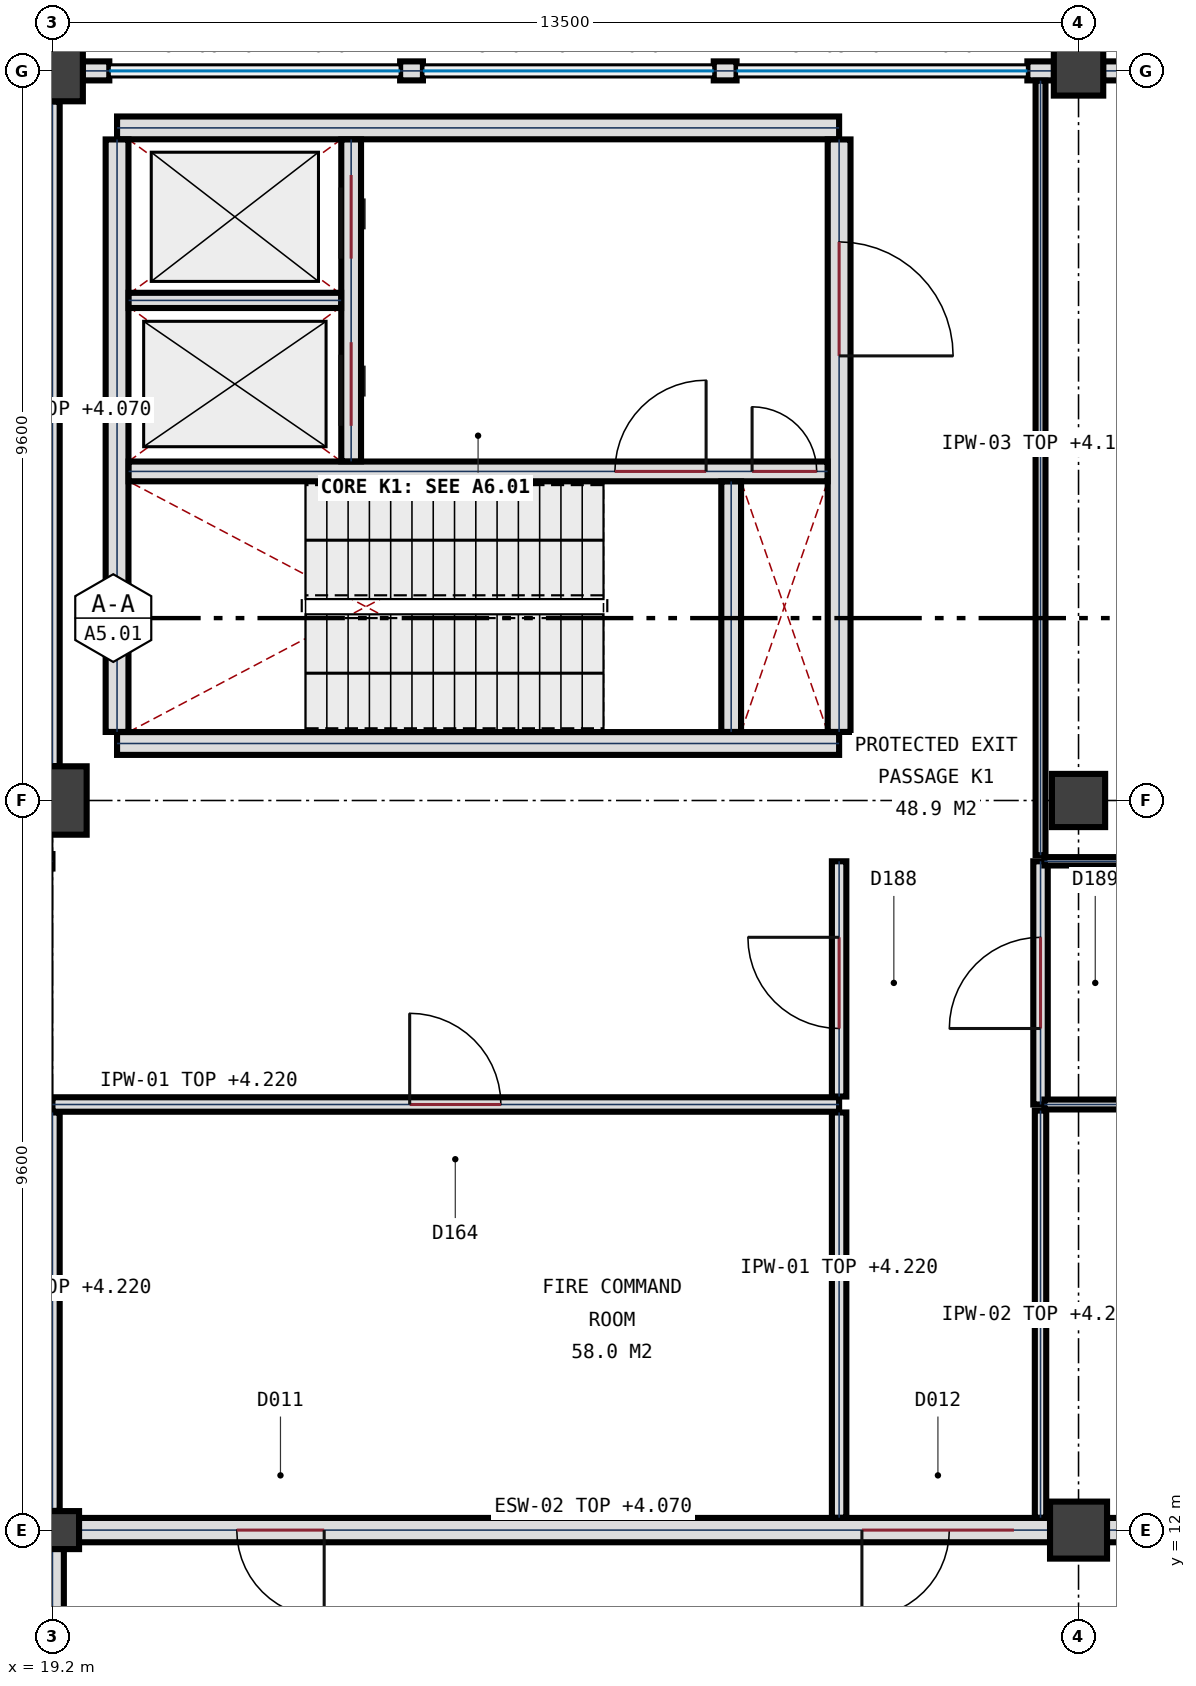
"""IFC4 building model, lengths in metres.
Left out: names, types, materials, properties, quantities, classifications, styles, units other than length and angle.
Written with IfcOpenShell. Run it as: python <this file> out.ifc"""

import sys

from ifc_helpers import new_model, si_unit, direction, frame, frame_2d, origin, origin_2d, place, context, subcontext, project, spatial, rectangle, circle, extrude, element, fill, save


model = new_model("IFC4")
c1 = context("Model", 3, precision=1e-05, world=origin(), true_north=direction((0.0, 1.0)))
c2 = subcontext(c1, "Body", "Model", "MODEL_VIEW")
j1 = project(units=[si_unit("LENGTHUNIT", "METRE"), si_unit("PLANEANGLEUNIT", "RADIAN")], contexts=[c1])
p1 = place(None, origin())
s1 = spatial("IfcSite", under=j1, at=p1, CompositionType="ELEMENT")
p2 = place(p1, origin())
s2 = spatial("IfcBuilding", under=s1, at=p2, CompositionType="ELEMENT")
p3 = place(p2, origin())
s3 = spatial("IfcBuildingStorey", under=s2, at=p3, CompositionType="ELEMENT", Elevation=0.0)
p4 = place(p3, frame((19.2, 12.0, 0.0), z_axis=(0.0, 0.0, 1.0), x_axis=(1.0, 0.0, 0.0)))
e1 = element("IfcColumn", 1, at=p4, inside=s3, PredefinedType="COLUMN", context=c2, shape_type="SweptSolid", body=[
    extrude(rectangle(XDim=0.7, YDim=0.5, at=origin_2d()), origin(), (0.0, 0.0, 1.0), 5.4),
])
p5 = place(p3, frame((19.2, 21.6, 0.0), z_axis=(0.0, 0.0, 1.0), x_axis=(1.0, 0.0, 0.0)))
e2 = element("IfcColumn", 2, at=p5, inside=s3, PredefinedType="COLUMN", context=c2, shape_type="SweptSolid", body=[
    extrude(circle(Radius=0.45, at=origin_2d()), origin(), (0.0, 0.0, 1.0), 5.4),
])
p6 = place(p3, frame((19.2, 31.2, 0.0), z_axis=(0.0, 0.0, 1.0), x_axis=(1.0, 0.0, 0.0)))
e3 = element("IfcColumn", 3, at=p6, inside=s3, PredefinedType="COLUMN", context=c2, shape_type="SweptSolid", body=[
    extrude(circle(Radius=0.4, at=origin_2d()), origin(), (0.0, 0.0, 1.0), 5.4),
])
p7 = place(p3, frame((32.7, 12.0, 0.0), z_axis=(0.0, 0.0, 1.0), x_axis=(1.0, 0.0, 0.0)))
e4 = element("IfcColumn", 4, at=p7, inside=s3, PredefinedType="COLUMN", context=c2, shape_type="SweptSolid", body=[
    extrude(rectangle(XDim=0.75, YDim=0.75, at=origin_2d()), origin(), (0.0, 0.0, 1.0), 5.4),
])
p8 = place(p3, frame((32.7, 21.6, 0.0), z_axis=(0.0, 0.0, 1.0), x_axis=(1.0, 0.0, 0.0)))
e5 = element("IfcColumn", 5, at=p8, inside=s3, PredefinedType="COLUMN", context=c2, shape_type="SweptSolid", body=[
    extrude(rectangle(XDim=0.7, YDim=0.7, at=origin_2d()), origin(), (0.0, 0.0, 1.0), 5.4),
])
p9 = place(p3, frame((32.7, 31.2, 0.0), z_axis=(0.0, 0.0, 1.0), x_axis=(1.0, 0.0, 0.0)))
e6 = element("IfcColumn", 6, at=p9, inside=s3, PredefinedType="COLUMN", context=c2, shape_type="SweptSolid", body=[
    extrude(rectangle(XDim=0.65, YDim=0.65, at=origin_2d()), origin(), (0.0, 0.0, 1.0), 5.4),
])
p10 = place(p3, frame((45.902, 12.0, 0.0), z_axis=(0.0, 0.0, 1.0), x_axis=(-1.0, 0.0, 0.0)))
e7 = element("IfcWall", 7, at=p10, inside=s3, PredefinedType="SOLIDWALL", context=c2, shape_type="SweptSolid", body=[
    extrude(rectangle(XDim=12.829, YDim=0.32, at=frame_2d((6.415, 0.0))), origin(), (0.0, 0.0, 1.0), 3.74),
])
p11 = place(p10, frame((2.492, 0.0, 0.0)))
e8 = element("IfcOpeningElement", 8, at=p11, cuts=e7, PredefinedType="OPENING", context=c2, shape_type="SweptSolid", body=[
    extrude(rectangle(XDim=2.2, YDim=2.45, at=frame_2d((1.1, 1.225))), frame((0.0, 0.17, 0.0), z_axis=(0.0, -1.0, 0.0), x_axis=(1.0, 0.0, 0.0)), (0.0, 0.0, 1.0), 0.34),
])
p12 = place(p10, frame((8.137, 0.0, 0.0)))
e9 = element("IfcOpeningElement", 9, at=p12, cuts=e7, PredefinedType="OPENING", context=c2, shape_type="SweptSolid", body=[
    extrude(rectangle(XDim=2.2, YDim=2.45, at=frame_2d((1.1, 1.225))), frame((0.0, 0.17, 0.0), z_axis=(0.0, -1.0, 0.0), x_axis=(1.0, 0.0, 0.0)), (0.0, 0.0, 1.0), 0.34),
])
p13 = place(p3, frame((32.327, 12.0, 0.0), z_axis=(0.0, 0.0, 1.0), x_axis=(-1.0, 0.0, 0.0)))
e10 = element("IfcWall", 10, at=p13, inside=s3, PredefinedType="SOLIDWALL", context=c2, shape_type="SweptSolid", body=[
    extrude(rectangle(XDim=12.779, YDim=0.32, at=frame_2d((6.389, 0.0))), origin(), (0.0, 0.0, 1.0), 4.07),
])
p14 = place(p13, frame((9.552, 0.0, 0.0)))
e11 = element("IfcOpeningElement", 11, at=p14, cuts=e10, PredefinedType="OPENING", context=c2, shape_type="SweptSolid", body=[
    extrude(rectangle(XDim=1.15, YDim=2.15, at=frame_2d((0.575, 1.075))), frame((0.0, 0.17, 0.0), z_axis=(0.0, -1.0, 0.0), x_axis=(1.0, 0.0, 0.0)), (0.0, 0.0, 1.0), 0.34),
])
p15 = place(p13, frame((0.477, 0.0, 0.0)))
e12 = element("IfcOpeningElement", 12, at=p15, cuts=e10, PredefinedType="OPENING", context=c2, shape_type="SweptSolid", body=[
    extrude(rectangle(XDim=2.0, YDim=2.35, at=frame_2d((1.0, 1.175))), frame((0.0, 0.17, 0.0), z_axis=(0.0, -1.0, 0.0), x_axis=(1.0, 0.0, 0.0)), (0.0, 0.0, 1.0), 0.34),
])
p16 = place(p3, frame((19.2, 11.752, 0.0), z_axis=(0.0, 0.0, 1.0), x_axis=(0.0, -1.0, 0.0)))
e13 = element("IfcWall", 13, at=p16, inside=s3, PredefinedType="SOLIDWALL", context=c2, shape_type="SweptSolid", body=[
    extrude(rectangle(XDim=2.95, YDim=0.3, at=frame_2d((1.475, 0.0))), origin(), (0.0, 0.0, 1.0), 4.22),
])
p17 = place(p3, frame((19.598, 31.2, 0.0), z_axis=(0.0, 0.0, 1.0), x_axis=(1.0, 0.0, 0.0)))
e14 = element("IfcWall", 14, at=p17, inside=s3, PredefinedType="SOLIDWALL", context=c2, shape_type="SweptSolid", body=[
    extrude(rectangle(XDim=0.35, YDim=0.25, at=frame_2d((0.175, 0.0))), origin(), (0.0, 0.0, 1.0), 4.07),
])
p18 = place(p3, frame((32.027, 31.2, 0.0), z_axis=(0.0, 0.0, 1.0), x_axis=(1.0, 0.0, 0.0)))
e15 = element("IfcWall", 15, at=p18, inside=s3, PredefinedType="SOLIDWALL", context=c2, shape_type="SweptSolid", body=[
    extrude(rectangle(XDim=0.35, YDim=0.25, at=frame_2d((0.175, 0.0))), origin(), (0.0, 0.0, 1.0), 4.07),
])
p19 = place(p3, frame((23.774, 31.2, 0.0), z_axis=(0.0, 0.0, 1.0), x_axis=(1.0, 0.0, 0.0)))
e16 = element("IfcWall", 16, at=p19, inside=s3, PredefinedType="SOLIDWALL", context=c2, shape_type="SweptSolid", body=[
    extrude(rectangle(XDim=0.3, YDim=0.25, at=frame_2d((0.15, 0.0))), origin(), (0.0, 0.0, 1.0), 4.07),
])
p20 = place(p3, frame((27.901, 31.2, 0.0), z_axis=(0.0, 0.0, 1.0), x_axis=(1.0, 0.0, 0.0)))
e17 = element("IfcWall", 17, at=p20, inside=s3, PredefinedType="SOLIDWALL", context=c2, shape_type="SweptSolid", body=[
    extrude(rectangle(XDim=0.3, YDim=0.25, at=frame_2d((0.15, 0.0))), origin(), (0.0, 0.0, 1.0), 4.07),
])
p21 = place(p3, frame((33.023, 31.2, 0.0), z_axis=(0.0, 0.0, 1.0), x_axis=(1.0, 0.0, 0.0)))
e18 = element("IfcWall", 18, at=p21, inside=s3, PredefinedType="SOLIDWALL", context=c2, shape_type="SweptSolid", body=[
    extrude(rectangle(XDim=0.35, YDim=0.25, at=frame_2d((0.175, 0.0))), origin(), (0.0, 0.0, 1.0), 4.17),
])
for number, where, z_axis, x_axis in (
    (19, (29.55, 22.35, 0.0), (0.0, 0.0, 1.0), (-1.0, 0.0, 0.0)),
    (20, (20.05, 30.45, 0.0), (0.0, 0.0, 1.0), (1.0, 0.0, 0.0)),
):
    element("IfcWall", number, at=place(p3, frame(where, z_axis=z_axis, x_axis=x_axis)), inside=s3, PredefinedType="SHEAR", context=c2, shape_type="SweptSolid", body=[
        extrude(rectangle(XDim=9.5, YDim=0.3, at=frame_2d((4.75, 0.0))), origin(), (0.0, 0.0, 1.0), 5.4),
    ])
p22 = place(p3, frame((20.05, 22.502, 0.0), z_axis=(0.0, 0.0, 1.0), x_axis=(0.0, 1.0, 0.0)))
e21 = element("IfcWall", 21, at=p22, inside=s3, PredefinedType="SHEAR", context=c2, shape_type="SweptSolid", body=[
    extrude(rectangle(XDim=7.796, YDim=0.3, at=frame_2d((3.898, 0.0))), origin(), (0.0, 0.0, 1.0), 5.4),
])
p23 = place(p3, frame((29.55, 30.298, 0.0), z_axis=(0.0, 0.0, 1.0), x_axis=(0.0, -1.0, 0.0)))
e22 = element("IfcWall", 22, at=p23, inside=s3, PredefinedType="SHEAR", context=c2, shape_type="SweptSolid", body=[
    extrude(rectangle(XDim=7.796, YDim=0.3, at=frame_2d((3.898, 0.0))), origin(), (0.0, 0.0, 1.0), 5.4),
])
p24 = place(p23, frame((1.348, 0.0, 0.0)))
e23 = element("IfcOpeningElement", 23, at=p24, cuts=e22, PredefinedType="OPENING", context=c2, shape_type="SweptSolid", body=[
    extrude(rectangle(XDim=1.5, YDim=2.25, at=frame_2d((0.75, 1.125))), frame((0.0, 0.16, 0.0), z_axis=(0.0, -1.0, 0.0), x_axis=(1.0, 0.0, 0.0)), (0.0, 0.0, 1.0), 0.32),
])
p25 = place(p3, frame((20.202, 25.93, 0.0), z_axis=(0.0, 0.0, 1.0), x_axis=(1.0, 0.0, 0.0)))
e24 = element("IfcWall", 24, at=p25, inside=s3, PredefinedType="SHEAR", context=c2, shape_type="SweptSolid", body=[
    extrude(rectangle(XDim=9.196, YDim=0.26, at=frame_2d((4.598, 0.0))), origin(), (0.0, 0.0, 1.0), 5.4),
])
p26 = place(p25, frame((6.398, 0.0, 0.0)))
e25 = element("IfcOpeningElement", 25, at=p26, cuts=e24, PredefinedType="OPENING", context=c2, shape_type="SweptSolid", body=[
    extrude(rectangle(XDim=1.2, YDim=2.2, at=frame_2d((0.6, 1.1))), frame((0.0, 0.14, 0.0), z_axis=(0.0, -1.0, 0.0), x_axis=(1.0, 0.0, 0.0)), (0.0, 0.0, 1.0), 0.28),
])
p27 = place(p25, frame((8.203, 0.0, 0.0)))
e26 = element("IfcOpeningElement", 26, at=p27, cuts=e24, PredefinedType="OPENING", context=c2, shape_type="SweptSolid", body=[
    extrude(rectangle(XDim=0.85, YDim=2.05, at=frame_2d((0.425, 1.025))), frame((0.0, 0.14, 0.0), z_axis=(0.0, -1.0, 0.0), x_axis=(1.0, 0.0, 0.0)), (0.0, 0.0, 1.0), 0.28),
])
p28 = place(p3, frame((28.13, 22.502, 0.0), z_axis=(0.0, 0.0, 1.0), x_axis=(0.0, 1.0, 0.0)))
e27 = element("IfcWall", 27, at=p28, inside=s3, PredefinedType="SHEAR", context=c2, shape_type="SweptSolid", body=[
    extrude(rectangle(XDim=3.296, YDim=0.26, at=frame_2d((1.648, 0.0))), origin(), (0.0, 0.0, 1.0), 5.4),
])
p29 = place(p3, frame((23.13, 26.062, 0.0), z_axis=(0.0, 0.0, 1.0), x_axis=(0.0, 1.0, 0.0)))
e28 = element("IfcWall", 28, at=p29, inside=s3, PredefinedType="SHEAR", context=c2, shape_type="SweptSolid", body=[
    extrude(rectangle(XDim=4.236, YDim=0.26, at=frame_2d((2.118, 0.0))), origin(), (0.0, 0.0, 1.0), 5.4),
])
p30 = place(p29, frame((0.468, 0.0, 0.0)))
e29 = element("IfcOpeningElement", 29, at=p30, cuts=e28, PredefinedType="OPENING", context=c2, shape_type="SweptSolid", body=[
    extrude(rectangle(XDim=1.1, YDim=2.15, at=frame_2d((0.55, 1.075))), frame((0.0, 0.14, 0.0), z_axis=(0.0, -1.0, 0.0), x_axis=(1.0, 0.0, 0.0)), (0.0, 0.0, 1.0), 0.28),
])
p31 = place(p29, frame((2.668, 0.0, 0.0)))
e30 = element("IfcOpeningElement", 30, at=p31, cuts=e28, PredefinedType="OPENING", context=c2, shape_type="SweptSolid", body=[
    extrude(rectangle(XDim=1.1, YDim=2.15, at=frame_2d((0.55, 1.075))), frame((0.0, 0.14, 0.0), z_axis=(0.0, -1.0, 0.0), x_axis=(1.0, 0.0, 0.0)), (0.0, 0.0, 1.0), 0.28),
])
p32 = place(p3, frame((20.202, 28.18, 0.0), z_axis=(0.0, 0.0, 1.0), x_axis=(1.0, 0.0, 0.0)))
e31 = element("IfcWall", 31, at=p32, inside=s3, PredefinedType="PLUMBINGWALL", context=c2, shape_type="SweptSolid", body=[
    extrude(rectangle(XDim=2.796, YDim=0.2, at=frame_2d((1.398, 0.0))), origin(), (0.0, 0.0, 1.0), 5.08),
])
p33 = place(p3, frame((19.2, 17.6, 0.0), z_axis=(0.0, 0.0, 1.0), x_axis=(1.0, 0.0, 0.0)))
e32 = element("IfcWall", 32, at=p33, inside=s3, PredefinedType="PARTITIONING", context=c2, shape_type="SweptSolid", body=[
    extrude(rectangle(XDim=10.35, YDim=0.19, at=frame_2d((5.175, 0.0))), origin(), (0.0, 0.0, 1.0), 4.22),
])
p34 = place(p33, frame((4.7, 0.0, 0.0)))
e33 = element("IfcOpeningElement", 33, at=p34, cuts=e32, PredefinedType="OPENING", context=c2, shape_type="SweptSolid", body=[
    extrude(rectangle(XDim=1.2, YDim=2.2, at=frame_2d((0.6, 1.1))), frame((0.0, 0.105, 0.0), z_axis=(0.0, -1.0, 0.0), x_axis=(1.0, 0.0, 0.0)), (0.0, 0.0, 1.0), 0.21),
])
p35 = place(p3, frame((19.2, 12.253, 0.0), z_axis=(0.0, 0.0, 1.0), x_axis=(0.0, 1.0, 0.0)))
e34 = element("IfcWall", 34, at=p35, inside=s3, PredefinedType="PARTITIONING", context=c2, shape_type="SweptSolid", body=[
    extrude(rectangle(XDim=5.242, YDim=0.19, at=frame_2d((2.621, 0.0))), origin(), (0.0, 0.0, 1.0), 4.22),
])
p36 = place(p3, frame((29.55, 12.163, 0.0), z_axis=(0.0, 0.0, 1.0), x_axis=(0.0, 1.0, 0.0)))
e35 = element("IfcWall", 35, at=p36, inside=s3, PredefinedType="PARTITIONING", context=c2, shape_type="SweptSolid", body=[
    extrude(rectangle(XDim=5.332, YDim=0.19, at=frame_2d((2.666, 0.0))), origin(), (0.0, 0.0, 1.0), 4.22),
])
p37 = place(p3, frame((29.55, 17.705, 0.0), z_axis=(0.0, 0.0, 1.0), x_axis=(0.0, 1.0, 0.0)))
e36 = element("IfcWall", 36, at=p37, inside=s3, PredefinedType="PARTITIONING", context=c2, shape_type="SweptSolid", body=[
    extrude(rectangle(XDim=3.095, YDim=0.19, at=frame_2d((1.547, 0.0))), origin(), (0.0, 0.0, 1.0), 5.08),
])
p38 = place(p37, frame((0.895, 0.0, 0.0)))
e37 = element("IfcOpeningElement", 37, at=p38, cuts=e36, PredefinedType="OPENING", context=c2, shape_type="SweptSolid", body=[
    extrude(rectangle(XDim=1.2, YDim=2.2, at=frame_2d((0.6, 1.1))), frame((0.0, 0.105, 0.0), z_axis=(0.0, -1.0, 0.0), x_axis=(1.0, 0.0, 0.0)), (0.0, 0.0, 1.0), 0.21),
])
p39 = place(p3, frame((32.2, 17.6, 0.0), z_axis=(0.0, 0.0, 1.0), x_axis=(0.0, 1.0, 0.0)))
e38 = element("IfcWall", 38, at=p39, inside=s3, PredefinedType="PARTITIONING", context=c2, shape_type="SweptSolid", body=[
    extrude(rectangle(XDim=3.2, YDim=0.19, at=frame_2d((1.6, 0.0))), origin(), (0.0, 0.0, 1.0), 5.08),
])
p40 = place(p39, frame((1.0, 0.0, 0.0)))
e39 = element("IfcOpeningElement", 39, at=p40, cuts=e38, PredefinedType="OPENING", context=c2, shape_type="SweptSolid", body=[
    extrude(rectangle(XDim=1.2, YDim=2.2, at=frame_2d((0.6, 1.1))), frame((0.0, 0.105, 0.0), z_axis=(0.0, -1.0, 0.0), x_axis=(1.0, 0.0, 0.0)), (0.0, 0.0, 1.0), 0.21),
])
p41 = place(p3, frame((32.25, 17.6, 0.0), z_axis=(0.0, 0.0, 1.0), x_axis=(1.0, 0.0, 0.0)))
e40 = element("IfcWall", 40, at=p41, inside=s3, PredefinedType="PARTITIONING", context=c2, shape_type="SweptSolid", body=[
    extrude(rectangle(XDim=42.7, YDim=0.13, at=frame_2d((21.35, 0.0))), origin(), (0.0, 0.0, 1.0), 4.42),
])
p42 = place(p41, frame((16.325, 0.0, 0.0)))
e41 = element("IfcOpeningElement", 41, at=p42, cuts=e40, PredefinedType="OPENING", context=c2, shape_type="SweptSolid", body=[
    extrude(rectangle(XDim=1.85, YDim=2.35, at=frame_2d((0.925, 1.175))), frame((0.0, 0.075, 0.0), z_axis=(0.0, -1.0, 0.0), x_axis=(1.0, 0.0, 0.0)), (0.0, 0.0, 1.0), 0.15),
])
p43 = place(p41, frame((33.225, 0.0, 0.0)))
e42 = element("IfcOpeningElement", 42, at=p43, cuts=e40, PredefinedType="OPENING", context=c2, shape_type="SweptSolid", body=[
    extrude(rectangle(XDim=1.85, YDim=2.35, at=frame_2d((0.925, 1.175))), frame((0.0, 0.075, 0.0), z_axis=(0.0, -1.0, 0.0), x_axis=(1.0, 0.0, 0.0)), (0.0, 0.0, 1.0), 0.15),
])
p44 = place(p3, frame((32.25, 20.8, 0.0), z_axis=(0.0, 0.0, 1.0), x_axis=(1.0, 0.0, 0.0)))
e43 = element("IfcWall", 43, at=p44, inside=s3, PredefinedType="PARTITIONING", context=c2, shape_type="SweptSolid", body=[
    extrude(rectangle(XDim=14.8, YDim=0.11, at=frame_2d((7.4, 0.0))), origin(), (0.0, 0.0, 1.0), 4.42),
])
p45 = place(p44, frame((6.75, 0.0, 0.0)))
e44 = element("IfcOpeningElement", 44, at=p45, cuts=e43, PredefinedType="OPENING", context=c2, shape_type="SweptSolid", body=[
    extrude(rectangle(XDim=1.0, YDim=2.2, at=frame_2d((0.5, 1.1))), frame((0.0, 0.065, 0.0), z_axis=(0.0, -1.0, 0.0), x_axis=(1.0, 0.0, 0.0)), (0.0, 0.0, 1.0), 0.13),
])
p46 = place(p3, frame((19.2, 22.053, 0.0), z_axis=(0.0, 0.0, 1.0), x_axis=(0.0, 1.0, 0.0)))
e45 = element("IfcWall", 45, at=p46, inside=s3, PredefinedType="PARTITIONING", context=c2, shape_type="SweptSolid", body=[
    extrude(rectangle(XDim=8.744, YDim=0.19, at=frame_2d((4.372, 0.0))), origin(), (0.0, 0.0, 1.0), 4.07),
])
p47 = place(p3, frame((32.2, 12.163, 0.0), z_axis=(0.0, 0.0, 1.0), x_axis=(0.0, 1.0, 0.0)))
e46 = element("IfcWall", 46, at=p47, inside=s3, PredefinedType="PARTITIONING", context=c2, shape_type="SweptSolid", body=[
    extrude(rectangle(XDim=5.357, YDim=0.15, at=frame_2d((2.678, 0.0))), origin(), (0.0, 0.0, 1.0), 4.22),
])
p48 = place(p3, frame((32.2, 20.88, 0.0), z_axis=(0.0, 0.0, 1.0), x_axis=(0.0, 1.0, 0.0)))
e47 = element("IfcWall", 47, at=p48, inside=s3, PredefinedType="PARTITIONING", context=c2, shape_type="SweptSolid", body=[
    extrude(rectangle(XDim=10.191, YDim=0.13, at=frame_2d((5.096, 0.0))), origin(), (0.0, 0.0, 1.0), 4.12),
])
p49 = place(p14, origin())
e48 = element("IfcDoor", 48, at=p49, inside=s3, OperationType="SINGLE_SWING_LEFT", PredefinedType="DOOR", context=c2, shape_type="SweptSolid", body=[
    extrude(rectangle(XDim=1.15, YDim=2.15, at=frame_2d((0.575, 1.075))), frame((0.0, 0.032, 0.0), z_axis=(0.0, -1.0, 0.0), x_axis=(1.0, 0.0, 0.0)), (0.0, 0.0, 1.0), 0.065),
])
fill(e11, e48)
p50 = place(p15, origin())
e49 = element("IfcDoor", 49, at=p50, inside=s3, OperationType="SINGLE_SWING_RIGHT", PredefinedType="DOOR", context=c2, shape_type="SweptSolid", body=[
    extrude(rectangle(XDim=2.0, YDim=2.35, at=frame_2d((1.0, 1.175))), frame((0.0, 0.032, 0.0), z_axis=(0.0, -1.0, 0.0), x_axis=(1.0, 0.0, 0.0)), (0.0, 0.0, 1.0), 0.065),
])
fill(e12, e49)
p51 = place(p24, origin())
e50 = element("IfcDoor", 50, at=p51, inside=s3, OperationType="SINGLE_SWING_RIGHT", PredefinedType="DOOR", context=c2, shape_type="SweptSolid", body=[
    extrude(rectangle(XDim=1.5, YDim=2.25, at=frame_2d((0.75, 1.125))), frame((0.0, 0.032, 0.0), z_axis=(0.0, -1.0, 0.0), x_axis=(1.0, 0.0, 0.0)), (0.0, 0.0, 1.0), 0.065),
])
fill(e23, e50)
p52 = place(p26, origin())
e51 = element("IfcDoor", 51, at=p52, inside=s3, OperationType="SINGLE_SWING_RIGHT", PredefinedType="DOOR", context=c2, shape_type="SweptSolid", body=[
    extrude(rectangle(XDim=1.2, YDim=2.2, at=frame_2d((0.6, 1.1))), frame((0.0, 0.032, 0.0), z_axis=(0.0, -1.0, 0.0), x_axis=(1.0, 0.0, 0.0)), (0.0, 0.0, 1.0), 0.065),
])
fill(e25, e51)
p53 = place(p27, origin())
e52 = element("IfcDoor", 52, at=p53, inside=s3, OperationType="SINGLE_SWING_LEFT", PredefinedType="DOOR", context=c2, shape_type="SweptSolid", body=[
    extrude(rectangle(XDim=0.85, YDim=2.05, at=frame_2d((0.425, 1.025))), frame((0.0, 0.032, 0.0), z_axis=(0.0, -1.0, 0.0), x_axis=(1.0, 0.0, 0.0)), (0.0, 0.0, 1.0), 0.065),
])
fill(e26, e52)
p54 = place(p30, origin())
e53 = element("IfcDoor", 53, at=p54, inside=s3, OperationType="SLIDING_TO_LEFT", PredefinedType="DOOR", context=c2, shape_type="SweptSolid", body=[
    extrude(rectangle(XDim=1.1, YDim=2.15, at=frame_2d((0.55, 1.075))), frame((0.0, 0.032, 0.0), z_axis=(0.0, -1.0, 0.0), x_axis=(1.0, 0.0, 0.0)), (0.0, 0.0, 1.0), 0.065),
])
fill(e29, e53)
p55 = place(p31, origin())
e54 = element("IfcDoor", 54, at=p55, inside=s3, OperationType="SLIDING_TO_LEFT", PredefinedType="DOOR", context=c2, shape_type="SweptSolid", body=[
    extrude(rectangle(XDim=1.1, YDim=2.15, at=frame_2d((0.55, 1.075))), frame((0.0, 0.032, 0.0), z_axis=(0.0, -1.0, 0.0), x_axis=(1.0, 0.0, 0.0)), (0.0, 0.0, 1.0), 0.065),
])
fill(e30, e54)
p56 = place(p34, origin())
e55 = element("IfcDoor", 55, at=p56, inside=s3, OperationType="SINGLE_SWING_LEFT", PredefinedType="DOOR", context=c2, shape_type="SweptSolid", body=[
    extrude(rectangle(XDim=1.2, YDim=2.2, at=frame_2d((0.6, 1.1))), frame((0.0, 0.032, 0.0), z_axis=(0.0, -1.0, 0.0), x_axis=(1.0, 0.0, 0.0)), (0.0, 0.0, 1.0), 0.065),
])
fill(e33, e55)
p57 = place(p38, origin())
e56 = element("IfcDoor", 56, at=p57, inside=s3, OperationType="SINGLE_SWING_RIGHT", PredefinedType="DOOR", context=c2, shape_type="SweptSolid", body=[
    extrude(rectangle(XDim=1.2, YDim=2.2, at=frame_2d((0.6, 1.1))), frame((0.0, 0.032, 0.0), z_axis=(0.0, -1.0, 0.0), x_axis=(1.0, 0.0, 0.0)), (0.0, 0.0, 1.0), 0.065),
])
fill(e37, e56)
p58 = place(p40, origin())
e57 = element("IfcDoor", 57, at=p58, inside=s3, OperationType="SINGLE_SWING_LEFT", PredefinedType="DOOR", context=c2, shape_type="SweptSolid", body=[
    extrude(rectangle(XDim=1.2, YDim=2.2, at=frame_2d((0.6, 1.1))), frame((0.0, 0.032, 0.0), z_axis=(0.0, -1.0, 0.0), x_axis=(1.0, 0.0, 0.0)), (0.0, 0.0, 1.0), 0.065),
])
fill(e39, e57)
save(model, sys.argv[1])
